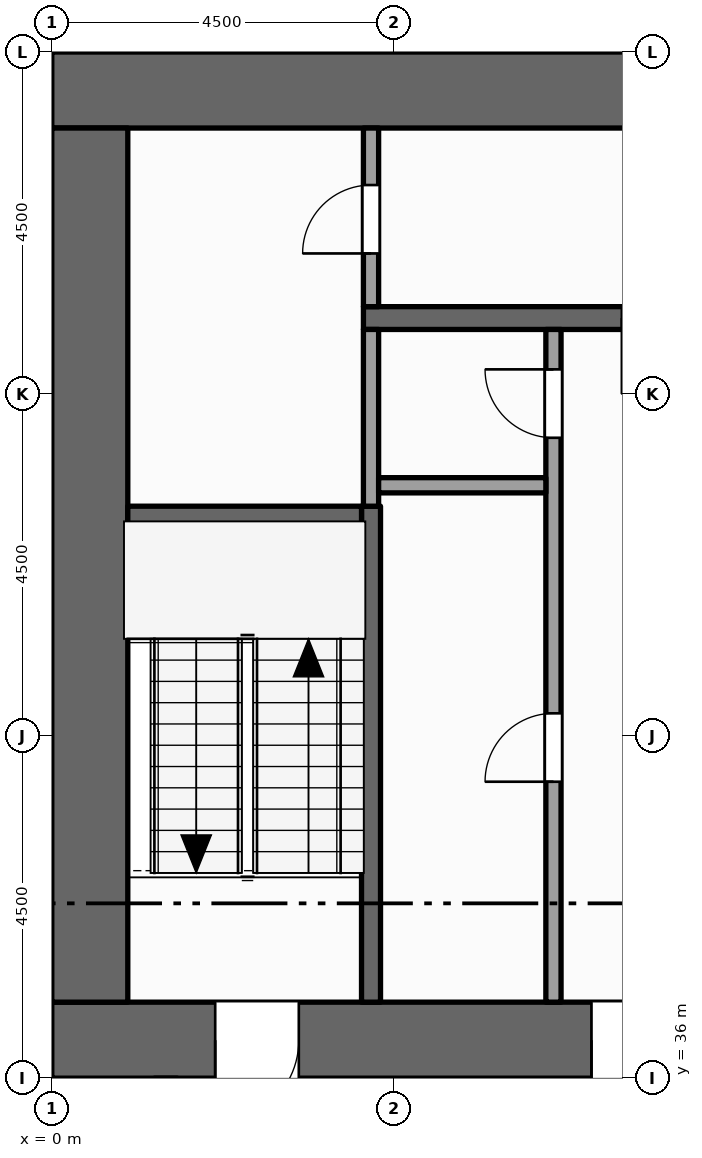
"""IFC4 building model, lengths in metres.
Left out: names, types, materials, properties, quantities, classifications, styles, units other than length and angle.
Written with IfcOpenShell. Run it as: python <this file> out.ifc"""

import sys

from ifc_helpers import new_model, si_unit, direction, frame, frame_2d, origin, place, context, subcontext, project, spatial, rectangle, extrude, element, fill, save


model = new_model("IFC4")
c1 = context("Model", 3, precision=1e-05, world=origin(), true_north=direction((0.0, 1.0)))
c2 = subcontext(c1, "Body", "Model", "MODEL_VIEW")
j1 = project(units=[si_unit("LENGTHUNIT", "METRE"), si_unit("PLANEANGLEUNIT", "RADIAN")], contexts=[c1])
p1 = place(None, origin())
s1 = spatial("IfcSite", under=j1, at=p1, CompositionType="ELEMENT")
p2 = place(p1, origin())
s2 = spatial("IfcBuilding", under=s1, at=p2, CompositionType="ELEMENT")
p3 = place(p2, frame((0.0, 0.0, 195.0)))
s3 = spatial("IfcBuildingStorey", under=s2, at=p3, CompositionType="ELEMENT", Elevation=195.0)
p4 = place(p3, frame((0.0, 36.5, -0.15), z_axis=(0.0, 0.0, 1.0), x_axis=(1.0, 0.0, 0.0)))
e1 = element("IfcWall", 1, at=p4, inside=s3, PredefinedType="SHEAR", context=c2, shape_type="SweptSolid", body=[
    extrude(rectangle(XDim=22.5, YDim=1.0, at=frame_2d((11.25, 0.0))), origin(), (0.0, 0.0, 1.0), 4.0),
])
p5 = place(p4, frame((7.1, 0.0, 0.15)))
e2 = element("IfcOpeningElement", 2, at=p5, cuts=e1, PredefinedType="OPENING", context=c2, shape_type="SweptSolid", body=[
    extrude(rectangle(XDim=1.8, YDim=2.1, at=frame_2d((0.9, 1.05))), frame((0.0, 0.51, 0.0), z_axis=(0.0, -1.0, 0.0), x_axis=(1.0, 0.0, 0.0)), (0.0, 0.0, 1.0), 1.02),
])
p6 = place(p4, frame((13.15, 0.0, 0.15)))
e3 = element("IfcOpeningElement", 3, at=p6, cuts=e1, PredefinedType="OPENING", context=c2, shape_type="SweptSolid", body=[
    extrude(rectangle(XDim=1.1, YDim=2.1, at=frame_2d((0.55, 1.05))), frame((0.0, 0.51, 0.0), z_axis=(0.0, -1.0, 0.0), x_axis=(1.0, 0.0, 0.0)), (0.0, 0.0, 1.0), 1.02),
])
p7 = place(p4, frame((2.15, 0.0, 0.15)))
e4 = element("IfcOpeningElement", 4, at=p7, cuts=e1, PredefinedType="OPENING", context=c2, shape_type="SweptSolid", body=[
    extrude(rectangle(XDim=1.1, YDim=2.1, at=frame_2d((0.55, 1.05))), frame((0.0, 0.51, 0.0), z_axis=(0.0, -1.0, 0.0), x_axis=(1.0, 0.0, 0.0)), (0.0, 0.0, 1.0), 1.02),
])
p8 = place(p4, frame((19.35, 0.0, 0.15)))
e5 = element("IfcOpeningElement", 5, at=p8, cuts=e1, PredefinedType="OPENING", context=c2, shape_type="SweptSolid", body=[
    extrude(rectangle(XDim=1.1, YDim=2.1, at=frame_2d((0.55, 1.05))), frame((0.0, 0.51, 0.0), z_axis=(0.0, -1.0, 0.0), x_axis=(1.0, 0.0, 0.0)), (0.0, 0.0, 1.0), 1.02),
])
p9 = place(p3, frame((0.0, 49.0, -0.15), z_axis=(0.0, 0.0, 1.0), x_axis=(1.0, 0.0, 0.0)))
e6 = element("IfcWall", 6, at=p9, inside=s3, PredefinedType="SHEAR", context=c2, shape_type="SweptSolid", body=[
    extrude(rectangle(XDim=22.5, YDim=1.0, at=frame_2d((11.25, 0.0))), origin(), (0.0, 0.0, 1.0), 4.0),
])
p10 = place(p3, frame((0.5, 37.0, -0.15), z_axis=(0.0, 0.0, 1.0), x_axis=(0.0, 1.0, 0.0)))
e7 = element("IfcWall", 7, at=p10, inside=s3, PredefinedType="SHEAR", context=c2, shape_type="SweptSolid", body=[
    extrude(rectangle(XDim=11.5, YDim=1.0, at=frame_2d((5.75, 0.0))), origin(), (0.0, 0.0, 1.0), 4.0),
])
p11 = place(p3, frame((4.2, 37.0, 0.0), z_axis=(0.0, 0.0, 1.0), x_axis=(0.0, 1.0, 0.0)))
e8 = element("IfcWall", 8, at=p11, inside=s3, PredefinedType="SHEAR", context=c2, shape_type="SweptSolid", body=[
    extrude(rectangle(XDim=6.525, YDim=0.25, at=frame_2d((3.262, 0.0))), origin(), (0.0, 0.0, 1.0), 3.85),
])
p12 = place(p3, frame((4.2, 43.525, 0.0), z_axis=(0.0, 0.0, 1.0), x_axis=(0.0, 1.0, 0.0)))
e9 = element("IfcWall", 9, at=p12, inside=s3, PredefinedType="PARTITIONING", context=c2, shape_type="SweptSolid", body=[
    extrude(rectangle(XDim=2.325, YDim=0.2, at=frame_2d((1.163, 0.0))), origin(), (0.0, 0.0, 1.0), 3.85),
])
p13 = place(p3, frame((4.2, 46.15, 0.0), z_axis=(0.0, 0.0, 1.0), x_axis=(0.0, 1.0, 0.0)))
e10 = element("IfcWall", 10, at=p13, inside=s3, PredefinedType="PARTITIONING", context=c2, shape_type="SweptSolid", body=[
    extrude(rectangle(XDim=2.35, YDim=0.2, at=frame_2d((1.175, 0.0))), origin(), (0.0, 0.0, 1.0), 3.85),
])
p14 = place(p13, frame((0.7, 0.0, 0.0)))
e11 = element("IfcOpeningElement", 11, at=p14, cuts=e10, PredefinedType="OPENING", context=c2, shape_type="SweptSolid", body=[
    extrude(rectangle(XDim=0.9, YDim=2.1, at=frame_2d((0.45, 1.05))), frame((0.0, 0.11, 0.0), z_axis=(0.0, -1.0, 0.0), x_axis=(1.0, 0.0, 0.0)), (0.0, 0.0, 1.0), 0.22),
])
p15 = place(p3, frame((6.6, 37.0, 0.0), z_axis=(0.0, 0.0, 1.0), x_axis=(0.0, 1.0, 0.0)))
e12 = element("IfcWall", 12, at=p15, inside=s3, PredefinedType="PARTITIONING", context=c2, shape_type="SweptSolid", body=[
    extrude(rectangle(XDim=8.85, YDim=0.2, at=frame_2d((4.425, 0.0))), origin(), (0.0, 0.0, 1.0), 3.85),
])
p16 = place(p15, frame((2.9, 0.0, 0.0)))
e13 = element("IfcOpeningElement", 13, at=p16, cuts=e12, PredefinedType="OPENING", context=c2, shape_type="SweptSolid", body=[
    extrude(rectangle(XDim=0.9, YDim=2.1, at=frame_2d((0.45, 1.05))), frame((0.0, 0.11, 0.0), z_axis=(0.0, -1.0, 0.0), x_axis=(1.0, 0.0, 0.0)), (0.0, 0.0, 1.0), 0.22),
])
p17 = place(p15, frame((7.425, 0.0, 0.0)))
e14 = element("IfcOpeningElement", 14, at=p17, cuts=e12, PredefinedType="OPENING", context=c2, shape_type="SweptSolid", body=[
    extrude(rectangle(XDim=0.9, YDim=2.1, at=frame_2d((0.45, 1.05))), frame((0.0, 0.11, 0.0), z_axis=(0.0, -1.0, 0.0), x_axis=(1.0, 0.0, 0.0)), (0.0, 0.0, 1.0), 0.22),
])
p18 = place(p3, frame((1.0, 43.4, 0.0), z_axis=(0.0, 0.0, 1.0), x_axis=(1.0, 0.0, 0.0)))
e15 = element("IfcWall", 15, at=p18, inside=s3, PredefinedType="SHEAR", context=c2, shape_type="SweptSolid", body=[
    extrude(rectangle(XDim=3.075, YDim=0.25, at=frame_2d((1.538, 0.0))), origin(), (0.0, 0.0, 1.0), 3.85),
])
p19 = place(p3, frame((4.3, 43.8, 0.0), z_axis=(0.0, 0.0, 1.0), x_axis=(1.0, 0.0, 0.0)))
e16 = element("IfcWall", 16, at=p19, inside=s3, PredefinedType="PARTITIONING", context=c2, shape_type="SweptSolid", body=[
    extrude(rectangle(XDim=2.2, YDim=0.2, at=frame_2d((1.1, 0.0))), origin(), (0.0, 0.0, 1.0), 3.85),
])
p20 = place(p3, frame((4.1, 46.0, 0.0), z_axis=(0.0, 0.0, 1.0), x_axis=(1.0, 0.0, 0.0)))
e17 = element("IfcWall", 17, at=p20, inside=s3, PredefinedType="SHEAR", context=c2, shape_type="SweptSolid", body=[
    extrude(rectangle(XDim=14.5, YDim=0.3, at=frame_2d((7.25, 0.0))), origin(), (0.0, 0.0, 1.0), 3.85),
])
p21 = place(p20, frame((3.4, 0.0, 0.0)))
e18 = element("IfcOpeningElement", 18, at=p21, cuts=e17, PredefinedType="OPENING", context=c2, shape_type="SweptSolid", body=[
    extrude(rectangle(XDim=1.0, YDim=2.1, at=frame_2d((0.5, 1.05))), frame((0.0, 0.16, 0.0), z_axis=(0.0, -1.0, 0.0), x_axis=(1.0, 0.0, 0.0)), (0.0, 0.0, 1.0), 0.32),
])
p22 = place(p20, frame((9.1, 0.0, 0.0)))
e19 = element("IfcOpeningElement", 19, at=p22, cuts=e17, PredefinedType="OPENING", context=c2, shape_type="SweptSolid", body=[
    extrude(rectangle(XDim=1.0, YDim=2.1, at=frame_2d((0.5, 1.05))), frame((0.0, 0.16, 0.0), z_axis=(0.0, -1.0, 0.0), x_axis=(1.0, 0.0, 0.0)), (0.0, 0.0, 1.0), 0.32),
])
p23 = place(p5, origin())
e20 = element("IfcDoor", 20, at=p23, inside=s3, OperationType="DOUBLE_DOOR_SINGLE_SWING", PredefinedType="DOOR", context=c2, shape_type="SweptSolid", body=[
    extrude(rectangle(XDim=1.8, YDim=2.1, at=frame_2d((0.9, 1.05))), frame((0.0, 0.025, 0.0), z_axis=(0.0, -1.0, 0.0), x_axis=(1.0, 0.0, 0.0)), (0.0, 0.0, 1.0), 0.05),
])
fill(e2, e20)
p24 = place(p7, origin())
e21 = element("IfcDoor", 21, at=p24, inside=s3, OperationType="SINGLE_SWING_LEFT", PredefinedType="DOOR", context=c2, shape_type="SweptSolid", body=[
    extrude(rectangle(XDim=1.1, YDim=2.1, at=frame_2d((0.55, 1.05))), frame((0.0, 0.025, 0.0), z_axis=(0.0, -1.0, 0.0), x_axis=(1.0, 0.0, 0.0)), (0.0, 0.0, 1.0), 0.05),
])
fill(e4, e21)
p25 = place(p14, origin())
e22 = element("IfcDoor", 22, at=p25, inside=s3, OperationType="SINGLE_SWING_LEFT", PredefinedType="DOOR", context=c2, shape_type="SweptSolid", body=[
    extrude(rectangle(XDim=0.9, YDim=2.1, at=frame_2d((0.45, 1.05))), frame((0.0, 0.025, 0.0), z_axis=(0.0, -1.0, 0.0), x_axis=(1.0, 0.0, 0.0)), (0.0, 0.0, 1.0), 0.05),
])
fill(e11, e22)
p26 = place(p16, origin())
e23 = element("IfcDoor", 23, at=p26, inside=s3, OperationType="SINGLE_SWING_LEFT", PredefinedType="DOOR", context=c2, shape_type="SweptSolid", body=[
    extrude(rectangle(XDim=0.9, YDim=2.1, at=frame_2d((0.45, 1.05))), frame((0.0, 0.025, 0.0), z_axis=(0.0, -1.0, 0.0), x_axis=(1.0, 0.0, 0.0)), (0.0, 0.0, 1.0), 0.05),
])
fill(e13, e23)
p27 = place(p17, origin())
e24 = element("IfcDoor", 24, at=p27, inside=s3, OperationType="SINGLE_SWING_RIGHT", PredefinedType="DOOR", context=c2, shape_type="SweptSolid", body=[
    extrude(rectangle(XDim=0.9, YDim=2.1, at=frame_2d((0.45, 1.05))), frame((0.0, 0.025, 0.0), z_axis=(0.0, -1.0, 0.0), x_axis=(1.0, 0.0, 0.0)), (0.0, 0.0, 1.0), 0.05),
])
fill(e14, e24)
save(model, sys.argv[1])
